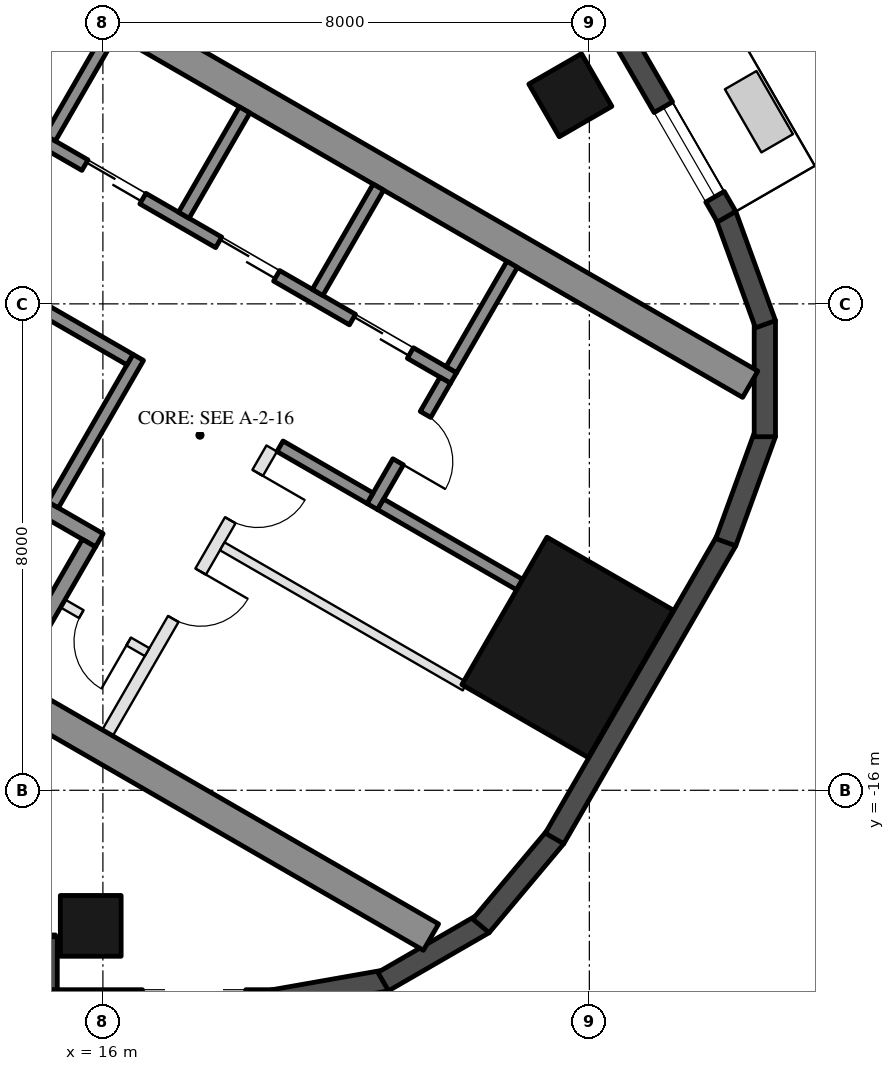
"""IFC4 building model, lengths in metres.
Left out: names, types, materials, properties, quantities, classifications, styles, units other than length and angle.
Written with IfcOpenShell. Run it as: python <this file> out.ifc"""

import sys

from ifc_helpers import new_model, si_unit, direction, frame, frame_2d, origin, origin_2d, place, context, subcontext, project, spatial, rectangle, hollow_rectangle, extrude, element, fill, save


model = new_model("IFC4")
c1 = context("Model", 3, precision=1e-05, world=origin(), true_north=direction((0.0, 1.0)))
c2 = subcontext(c1, "Body", "Model", "MODEL_VIEW")
j1 = project(units=[si_unit("LENGTHUNIT", "METRE"), si_unit("PLANEANGLEUNIT", "RADIAN")], contexts=[c1])
p1 = place(None, origin())
s1 = spatial("IfcSite", under=j1, at=p1, CompositionType="ELEMENT")
p2 = place(p1, origin())
s2 = spatial("IfcBuilding", under=s1, at=p2, CompositionType="ELEMENT")
p3 = place(p2, frame((0.0, 0.0, 79.8)))
s3 = spatial("IfcBuildingStorey", under=s2, at=p3, CompositionType="ELEMENT", Elevation=79.8)
for number, where, z_axis, x_axis in (
    (1, (15.8, -18.23, 0.0), (0.0, 0.0, 1.0), (-1.0, 0.0, 0.0)),
    (2, (23.688, -4.568, 0.0), (0.0, 0.0, 1.0), (-0.5, 0.866, 0.0)),
):
    element("IfcColumn", number, at=place(p3, frame(where, z_axis=z_axis, x_axis=x_axis)), inside=s3, PredefinedType="COLUMN", context=c2, shape_type="SweptSolid", body=[
        extrude(hollow_rectangle(XDim=1.0, YDim=1.0, WallThickness=0.045, at=origin_2d()), origin(), (0.0, 0.0, 1.0), 3.7),
    ])
p4 = place(p3, frame((23.643, -13.65, 0.0), z_axis=(0.0, 0.0, 1.0), x_axis=(0.5, 0.866025403784, 0.0)))
e3 = element("IfcColumn", 3, at=p4, inside=s3, PredefinedType="COLUMN", context=c2, shape_type="SweptSolid", body=[
    extrude(hollow_rectangle(XDim=2.8, YDim=2.4, WallThickness=0.07, at=origin_2d()), origin(), (0.0, 0.0, 1.0), 3.7),
])
p5 = place(p3, frame((8.48, -18.555, 0.0), z_axis=(0.0, 0.0, 1.0), x_axis=(1.0, 0.0, 0.0)))
e4 = element("IfcWall", 4, at=p5, inside=s3, PredefinedType="SOLIDWALL", context=c2, shape_type="SweptSolid", body=[
    extrude(rectangle(XDim=6.74, YDim=0.35, at=frame_2d((3.37, 0.0))), origin(), (0.0, 0.0, 1.0), 3.55),
])
p6 = place(p5, frame((3.57, 0.0, 0.0)))
e5 = element("IfcOpeningElement", 5, at=p6, cuts=e4, PredefinedType="OPENING", context=c2, shape_type="SweptSolid", body=[
    extrude(rectangle(XDim=2.4, YDim=2.4, at=frame_2d((1.2, 1.2))), frame((0.0, 0.185, 0.0), z_axis=(0.0, -1.0, 0.0), x_axis=(1.0, 0.0, 0.0)), (0.0, 0.0, 1.0), 0.37),
])
p7 = place(p5, frame((0.77, 0.0, 0.3)))
e6 = element("IfcOpeningElement", 6, at=p7, cuts=e4, PredefinedType="OPENING", context=c2, shape_type="SweptSolid", body=[
    extrude(rectangle(XDim=2.5, YDim=2.65, at=frame_2d((1.25, 1.325))), frame((0.0, 0.185, 0.0), z_axis=(0.0, -1.0, 0.0), x_axis=(1.0, 0.0, 0.0)), (0.0, 0.0, 1.0), 0.37),
])
p8 = place(p3, frame((15.075, -18.41, 0.0), z_axis=(0.0, 0.0, 1.0), x_axis=(0.0, -1.0, 0.0)))
e7 = element("IfcWall", 7, at=p8, inside=s3, PredefinedType="SOLIDWALL", context=c2, shape_type="SweptSolid", body=[
    extrude(rectangle(XDim=1.22, YDim=0.35, at=frame_2d((0.61, 0.0))), origin(), (0.0, 0.0, 1.0), 3.55),
])
p9 = place(p3, frame((14.9, -19.455, 0.0), z_axis=(0.0, 0.0, 1.0), x_axis=(1.0, 0.0, 0.0)))
e8 = element("IfcWall", 8, at=p9, inside=s3, PredefinedType="SOLIDWALL", context=c2, shape_type="SweptSolid", body=[
    extrude(rectangle(XDim=3.916, YDim=0.35, at=frame_2d((1.958, 0.0))), origin(), (0.0, 0.0, 1.0), 3.55),
])
p10 = place(p9, frame((1.75, 0.0, 0.3)))
e9 = element("IfcOpeningElement", 9, at=p10, cuts=e8, PredefinedType="OPENING", context=c2, shape_type="SweptSolid", body=[
    extrude(rectangle(XDim=1.7, YDim=2.65, at=frame_2d((0.85, 1.325))), frame((0.0, 0.185, 0.0), z_axis=(0.0, -1.0, 0.0), x_axis=(1.0, 0.0, 0.0)), (0.0, 0.0, 1.0), 0.37),
])
p11 = place(p3, frame((18.785, -19.458, 0.0), z_axis=(0.0, 0.0, 1.0), x_axis=(0.984798995425, 0.173697837091, 0.0)))
e10 = element("IfcWall", 10, at=p11, inside=s3, PredefinedType="SOLIDWALL", context=c2, shape_type="SweptSolid", body=[
    extrude(rectangle(XDim=1.91, YDim=0.35, at=frame_2d((0.955, 0.0))), origin(), (0.0, 0.0, 1.0), 3.55),
])
for number, where, z_axis, x_axis in (
    (11, (20.61, -19.147, 0.0), (0.0, 0.0, 1.0), (0.866, 0.5, 0.0)),
    (12, (22.217, -18.231, 0.0), (0.0, 0.0, 1.0), (0.643, 0.766, 0.0)),
):
    element("IfcWall", number, at=place(p3, frame(where, z_axis=z_axis, x_axis=x_axis)), inside=s3, PredefinedType="SOLIDWALL", context=c2, shape_type="SweptSolid", body=[
        extrude(rectangle(XDim=1.91, YDim=0.35, at=frame_2d((0.955, 0.0))), origin(), (0.0, 0.0, 1.0), 3.55),
    ])
p12 = place(p3, frame((23.427, -16.792, 0.0), z_axis=(0.0, 0.0, 1.0), x_axis=(0.500018773155, 0.866014564827, 0.0)))
e13 = element("IfcWall", 13, at=p12, inside=s3, PredefinedType="SOLIDWALL", context=c2, shape_type="SweptSolid", body=[
    extrude(rectangle(XDim=5.658, YDim=0.35, at=frame_2d((2.829, 0.0))), origin(), (0.0, 0.0, 1.0), 3.55),
])
for number, where, z_axis, x_axis in (
    (14, (26.244, -11.92, 0.0), (0.0, 0.0, 1.0), (0.342, 0.94, 0.0)),
    (15, (26.886, -10.185, 0.0), (0.0, 0.0, 1.0), (0.0, 1.0, 0.0)),
    (16, (26.897, -8.335, 0.0), (0.0, 0.0, 1.0), (-0.342, 0.94, 0.0)),
):
    element("IfcWall", number, at=place(p3, frame(where, z_axis=z_axis, x_axis=x_axis)), inside=s3, PredefinedType="SOLIDWALL", context=c2, shape_type="SweptSolid", body=[
        extrude(rectangle(XDim=1.91, YDim=0.35, at=frame_2d((0.955, 0.0))), origin(), (0.0, 0.0, 1.0), 3.55),
    ])
p13 = place(p3, frame((26.257, -6.567, 0.0), z_axis=(0.0, 0.0, 1.0), x_axis=(-0.500023526245, 0.866011820475, 0.0)))
e17 = element("IfcWall", 17, at=p13, inside=s3, PredefinedType="SOLIDWALL", context=c2, shape_type="SweptSolid", body=[
    extrude(rectangle(XDim=11.816, YDim=0.35, at=frame_2d((5.908, 0.0))), origin(), (0.0, 0.0, 1.0), 3.55),
])
p14 = place(p13, frame((0.38, 0.0, 0.3)))
e18 = element("IfcOpeningElement", 18, at=p14, cuts=e17, PredefinedType="OPENING", context=c2, shape_type="SweptSolid", body=[
    extrude(rectangle(XDim=1.7, YDim=2.65, at=frame_2d((0.85, 1.325))), frame((0.0, 0.185, 0.0), z_axis=(0.0, -1.0, 0.0), x_axis=(1.0, 0.0, 0.0)), (0.0, 0.0, 1.0), 0.37),
])
p15 = place(p13, frame((7.666, 0.0, 0.0)))
e19 = element("IfcOpeningElement", 19, at=p15, cuts=e17, PredefinedType="OPENING", context=c2, shape_type="SweptSolid", body=[
    extrude(rectangle(XDim=2.4, YDim=2.4, at=frame_2d((1.2, 1.2))), frame((0.0, 0.185, 0.0), z_axis=(0.0, -1.0, 0.0), x_axis=(1.0, 0.0, 0.0)), (0.0, 0.0, 1.0), 0.37),
])
p16 = place(p13, frame((3.865, 0.0, 0.3)))
e20 = element("IfcOpeningElement", 20, at=p16, cuts=e17, PredefinedType="OPENING", context=c2, shape_type="SweptSolid", body=[
    extrude(rectangle(XDim=1.6, YDim=2.65, at=frame_2d((0.8, 1.325))), frame((0.0, 0.185, 0.0), z_axis=(0.0, -1.0, 0.0), x_axis=(1.0, 0.0, 0.0)), (0.0, 0.0, 1.0), 0.37),
])
p17 = place(p13, frame((5.765, 0.0, 0.3)))
e21 = element("IfcOpeningElement", 21, at=p17, cuts=e17, PredefinedType="OPENING", context=c2, shape_type="SweptSolid", body=[
    extrude(rectangle(XDim=1.6, YDim=2.65, at=frame_2d((0.8, 1.325))), frame((0.0, 0.185, 0.0), z_axis=(0.0, -1.0, 0.0), x_axis=(1.0, 0.0, 0.0)), (0.0, 0.0, 1.0), 0.37),
])
for number, where, z_axis, x_axis in (
    (22, (8.547, -10.997, 0.0), (0.0, 0.0, 1.0), (0.866, -0.5, 0.0)),
    (23, (13.797, -1.903, 0.0), (0.0, 0.0, 1.0), (0.866, -0.5, 0.0)),
):
    element("IfcWall", number, at=place(p3, frame(where, z_axis=z_axis, x_axis=x_axis)), inside=s3, PredefinedType="SHEAR", context=c2, shape_type="SweptSolid", body=[
        extrude(rectangle(XDim=14.837, YDim=0.5, at=frame_2d((7.418, 0.0))), origin(), (0.0, 0.0, 1.0), 3.5),
    ])
p18 = place(p3, frame((10.356, -8.664, 0.0), z_axis=(0.0, 0.0, 1.0), x_axis=(0.866028629588, -0.499994412703, 0.0)))
e24 = element("IfcWall", 24, at=p18, inside=s3, PredefinedType="SHEAR", context=c2, shape_type="SweptSolid", body=[
    extrude(rectangle(XDim=6.45, YDim=0.25, at=frame_2d((3.225, 0.0))), origin(), (0.0, 0.0, 1.0), 3.5),
])
p19 = place(p18, frame((0.3, 0.0, 0.0)))
e25 = element("IfcOpeningElement", 25, at=p19, cuts=e24, PredefinedType="OPENING", context=c2, shape_type="SweptSolid", body=[
    extrude(rectangle(XDim=1.0, YDim=2.1, at=frame_2d((0.5, 1.05))), frame((0.0, 0.135, 0.0), z_axis=(0.0, -1.0, 0.0), x_axis=(1.0, 0.0, 0.0)), (0.0, 0.0, 1.0), 0.27),
])
p20 = place(p3, frame((14.496, -14.143, 0.0), z_axis=(0.0, 0.0, 1.0), x_axis=(0.500062241894, 0.865989465428, 0.0)))
e26 = element("IfcWall", 26, at=p20, inside=s3, PredefinedType="SHEAR", context=c2, shape_type="SweptSolid", body=[
    extrude(rectangle(XDim=2.55, YDim=0.25, at=frame_2d((1.275, 0.0))), origin(), (0.0, 0.0, 1.0), 3.5),
])
p21 = place(p3, frame((15.181, -11.305, 0.0), z_axis=(0.0, 0.0, 1.0), x_axis=(0.49994636267, 0.866056369097, 0.0)))
e27 = element("IfcWall", 27, at=p21, inside=s3, PredefinedType="SHEAR", context=c2, shape_type="SweptSolid", body=[
    extrude(rectangle(XDim=2.8, YDim=0.2, at=frame_2d((1.4, 0.0))), origin(), (0.0, 0.0, 1.0), 3.5),
])
p22 = place(p3, frame((14.02, -7.517, 0.0), z_axis=(0.0, 0.0, 1.0), x_axis=(0.866034573852, -0.49998411664, 0.0)))
e28 = element("IfcWall", 28, at=p22, inside=s3, PredefinedType="SHEAR", context=c2, shape_type="SweptSolid", body=[
    extrude(rectangle(XDim=2.8, YDim=0.2, at=frame_2d((1.4, 0.0))), origin(), (0.0, 0.0, 1.0), 3.5),
])
p23 = place(p3, frame((12.968, -4.138, 0.0), z_axis=(0.0, 0.0, 1.0), x_axis=(0.866028328073, -0.49999493495, 0.0)))
e29 = element("IfcWall", 29, at=p23, inside=s3, PredefinedType="SHEAR", context=c2, shape_type="SweptSolid", body=[
    extrude(rectangle(XDim=10.16, YDim=0.2, at=frame_2d((5.08, 0.0))), origin(), (0.0, 0.0, 1.0), 3.5),
])
p24 = place(p23, frame((0.62, 0.0, 0.0)))
e30 = element("IfcOpeningElement", 30, at=p24, cuts=e29, PredefinedType="OPENING", context=c2, shape_type="SweptSolid", body=[
    extrude(rectangle(XDim=1.1, YDim=2.1, at=frame_2d((0.55, 1.05))), frame((0.0, 0.11, 0.0), z_axis=(0.0, -1.0, 0.0), x_axis=(1.0, 0.0, 0.0)), (0.0, 0.0, 1.0), 0.22),
])
p25 = place(p23, frame((3.16, 0.0, 0.0)))
e31 = element("IfcOpeningElement", 31, at=p25, cuts=e29, PredefinedType="OPENING", context=c2, shape_type="SweptSolid", body=[
    extrude(rectangle(XDim=1.1, YDim=2.1, at=frame_2d((0.55, 1.05))), frame((0.0, 0.11, 0.0), z_axis=(0.0, -1.0, 0.0), x_axis=(1.0, 0.0, 0.0)), (0.0, 0.0, 1.0), 0.22),
])
p26 = place(p23, frame((5.7, 0.0, 0.0)))
e32 = element("IfcOpeningElement", 32, at=p26, cuts=e29, PredefinedType="OPENING", context=c2, shape_type="SweptSolid", body=[
    extrude(rectangle(XDim=1.1, YDim=2.1, at=frame_2d((0.55, 1.05))), frame((0.0, 0.11, 0.0), z_axis=(0.0, -1.0, 0.0), x_axis=(1.0, 0.0, 0.0)), (0.0, 0.0, 1.0), 0.22),
])
p27 = place(p23, frame((8.24, 0.0, 0.0)))
e33 = element("IfcOpeningElement", 33, at=p27, cuts=e29, PredefinedType="OPENING", context=c2, shape_type="SweptSolid", body=[
    extrude(rectangle(XDim=1.1, YDim=2.1, at=frame_2d((0.55, 1.05))), frame((0.0, 0.11, 0.0), z_axis=(0.0, -1.0, 0.0), x_axis=(1.0, 0.0, 0.0)), (0.0, 0.0, 1.0), 0.22),
])
p28 = place(p3, frame((20.43, -11.333, 0.0), z_axis=(0.0, 0.0, 1.0), x_axis=(0.500001309137, 0.866024647952, 0.0)))
e34 = element("IfcWall", 34, at=p28, inside=s3, PredefinedType="SHEAR", context=c2, shape_type="SweptSolid", body=[
    extrude(rectangle(XDim=2.4, YDim=0.2, at=frame_2d((1.2, 0.0))), origin(), (0.0, 0.0, 1.0), 3.5),
])
p29 = place(p28, frame((0.85, 0.0, 0.0)))
e35 = element("IfcOpeningElement", 35, at=p29, cuts=e34, PredefinedType="OPENING", context=c2, shape_type="SweptSolid", body=[
    extrude(rectangle(XDim=0.9, YDim=2.1, at=frame_2d((0.45, 1.05))), frame((0.0, 0.11, 0.0), z_axis=(0.0, -1.0, 0.0), x_axis=(1.0, 0.0, 0.0)), (0.0, 0.0, 1.0), 0.22),
])
p30 = place(p3, frame((18.913, -10.342, 0.0), z_axis=(0.0, 0.0, 1.0), x_axis=(0.866038183914, -0.499977863513, 0.0)))
e36 = element("IfcWall", 36, at=p30, inside=s3, PredefinedType="SHEAR", context=c2, shape_type="SweptSolid", body=[
    extrude(rectangle(XDim=1.71, YDim=0.2, at=frame_2d((0.855, 0.0))), origin(), (0.0, 0.0, 1.0), 3.5),
])
for number, where, z_axis, x_axis in (
    (37, (15.131, -5.272, 0.0), (0.0, 0.0, 1.0), (0.5, 0.866, 0.0)),
    (38, (17.331, -6.542, 0.0), (0.0, 0.0, 1.0), (0.5, 0.866, 0.0)),
    (39, (19.531, -7.812, 0.0), (0.0, 0.0, 1.0), (0.5, 0.866, 0.0)),
    (40, (21.73, -9.082, 0.0), (0.0, 0.0, 1.0), (0.5, 0.866, 0.0)),
):
    element("IfcWall", number, at=place(p3, frame(where, z_axis=z_axis, x_axis=x_axis)), inside=s3, PredefinedType="SHEAR", context=c2, shape_type="SweptSolid", body=[
        extrude(rectangle(XDim=2.0, YDim=0.2, at=frame_2d((1.0, 0.0))), origin(), (0.0, 0.0, 1.0), 3.5),
    ])
p31 = place(p3, frame((20.567, -11.297, 0.0), z_axis=(0.0, 0.0, 1.0), x_axis=(0.866060851709, -0.499938597367, 0.0)))
e41 = element("IfcWall", 41, at=p31, inside=s3, PredefinedType="SHEAR", context=c2, shape_type="SweptSolid", body=[
    extrude(rectangle(XDim=2.64, YDim=0.2, at=frame_2d((1.32, 0.0))), origin(), (0.0, 0.0, 1.0), 3.5),
])
p32 = place(p3, frame((16.076, -15.055, 0.0), z_axis=(0.0, 0.0, 1.0), x_axis=(0.499995103361, 0.866028230842, 0.0)))
e42 = element("IfcWall", 42, at=p32, inside=s3, PredefinedType="PARTITIONING", context=c2, shape_type="SweptSolid", body=[
    extrude(rectangle(XDim=5.4, YDim=0.2, at=frame_2d((2.7, 0.0))), origin(), (0.0, 0.0, 1.0), 3.5),
])
p33 = place(p32, frame((2.163, 0.0, 0.0)))
e43 = element("IfcOpeningElement", 43, at=p33, cuts=e42, PredefinedType="OPENING", context=c2, shape_type="SweptSolid", body=[
    extrude(rectangle(XDim=0.9, YDim=2.1, at=frame_2d((0.45, 1.05))), frame((0.0, 0.11, 0.0), z_axis=(0.0, -1.0, 0.0), x_axis=(1.0, 0.0, 0.0)), (0.0, 0.0, 1.0), 0.22),
])
p34 = place(p32, frame((4.038, 0.0, 0.0)))
e44 = element("IfcOpeningElement", 44, at=p34, cuts=e42, PredefinedType="OPENING", context=c2, shape_type="SweptSolid", body=[
    extrude(rectangle(XDim=0.9, YDim=2.1, at=frame_2d((0.45, 1.05))), frame((0.0, 0.11, 0.0), z_axis=(0.0, -1.0, 0.0), x_axis=(1.0, 0.0, 0.0)), (0.0, 0.0, 1.0), 0.22),
])
p35 = place(p3, frame((15.342, -12.928, 0.0), z_axis=(0.0, 0.0, 1.0), x_axis=(0.865989903783, -0.500061482766, 0.0)))
e45 = element("IfcWall", 45, at=p35, inside=s3, PredefinedType="PARTITIONING", context=c2, shape_type="SweptSolid", body=[
    extrude(rectangle(XDim=1.6, YDim=0.15, at=frame_2d((0.8, 0.0))), origin(), (0.0, 0.0, 1.0), 3.5),
])
p36 = place(p35, frame((0.35, 0.0, 0.0)))
e46 = element("IfcOpeningElement", 46, at=p36, cuts=e45, PredefinedType="OPENING", context=c2, shape_type="SweptSolid", body=[
    extrude(rectangle(XDim=0.9, YDim=2.1, at=frame_2d((0.45, 1.05))), frame((0.0, 0.085, 0.0), z_axis=(0.0, -1.0, 0.0), x_axis=(1.0, 0.0, 0.0)), (0.0, 0.0, 1.0), 0.17),
])
p37 = place(p3, frame((17.963, -11.987, 0.0), z_axis=(0.0, 0.0, 1.0), x_axis=(0.865998608524, -0.500046407882, 0.0)))
e47 = element("IfcWall", 47, at=p37, inside=s3, PredefinedType="PARTITIONING", context=c2, shape_type="SweptSolid", body=[
    extrude(rectangle(XDim=4.61, YDim=0.15, at=frame_2d((2.305, 0.0))), origin(), (0.0, 0.0, 1.0), 3.5),
])
p38 = place(p14, origin())
e48 = element("IfcWindow", 48, at=p38, inside=s3, PartitioningType="SINGLE_PANEL", PredefinedType="WINDOW", context=c2, shape_type="SweptSolid", body=[
    extrude(rectangle(XDim=1.7, YDim=2.65, at=frame_2d((0.85, 1.325))), frame((0.0, 0.03, 0.0), z_axis=(0.0, -1.0, 0.0), x_axis=(1.0, 0.0, 0.0)), (0.0, 0.0, 1.0), 0.06),
])
fill(e18, e48)
p39 = place(p36, frame((0.9, 0.0, 0.0), z_axis=(0.0, 0.0, 1.0), x_axis=(-1.0, 0.0, 0.0)))
e49 = element("IfcDoor", 49, at=p39, inside=s3, OperationType="SINGLE_SWING_LEFT", PredefinedType="DOOR", context=c2, shape_type="SweptSolid", body=[
    extrude(rectangle(XDim=0.9, YDim=2.1, at=frame_2d((0.45, 1.05))), frame((0.0, 0.025, 0.0), z_axis=(0.0, -1.0, 0.0), x_axis=(1.0, 0.0, 0.0)), (0.0, 0.0, 1.0), 0.05),
])
fill(e46, e49)
p40 = place(p25, origin())
e50 = element("IfcDoor", 50, at=p40, inside=s3, OperationType="DOUBLE_DOOR_SLIDING", PredefinedType="DOOR", context=c2, shape_type="SweptSolid", body=[
    extrude(rectangle(XDim=1.1, YDim=2.1, at=frame_2d((0.55, 1.05))), frame((0.0, 0.025, 0.0), z_axis=(0.0, -1.0, 0.0), x_axis=(1.0, 0.0, 0.0)), (0.0, 0.0, 1.0), 0.05),
])
fill(e31, e50)
p41 = place(p26, origin())
e51 = element("IfcDoor", 51, at=p41, inside=s3, OperationType="DOUBLE_DOOR_SLIDING", PredefinedType="DOOR", context=c2, shape_type="SweptSolid", body=[
    extrude(rectangle(XDim=1.1, YDim=2.1, at=frame_2d((0.55, 1.05))), frame((0.0, 0.025, 0.0), z_axis=(0.0, -1.0, 0.0), x_axis=(1.0, 0.0, 0.0)), (0.0, 0.0, 1.0), 0.05),
])
fill(e32, e51)
p42 = place(p27, origin())
e52 = element("IfcDoor", 52, at=p42, inside=s3, OperationType="DOUBLE_DOOR_SLIDING", PredefinedType="DOOR", context=c2, shape_type="SweptSolid", body=[
    extrude(rectangle(XDim=1.1, YDim=2.1, at=frame_2d((0.55, 1.05))), frame((0.0, 0.025, 0.0), z_axis=(0.0, -1.0, 0.0), x_axis=(1.0, 0.0, 0.0)), (0.0, 0.0, 1.0), 0.05),
])
fill(e33, e52)
p43 = place(p29, frame((0.9, 0.0, 0.0), z_axis=(0.0, 0.0, 1.0), x_axis=(-1.0, 0.0, 0.0)))
e53 = element("IfcDoor", 53, at=p43, inside=s3, OperationType="SINGLE_SWING_RIGHT", PredefinedType="DOOR", context=c2, shape_type="SweptSolid", body=[
    extrude(rectangle(XDim=0.9, YDim=2.1, at=frame_2d((0.45, 1.05))), frame((0.0, 0.025, 0.0), z_axis=(0.0, -1.0, 0.0), x_axis=(1.0, 0.0, 0.0)), (0.0, 0.0, 1.0), 0.05),
])
fill(e35, e53)
p44 = place(p33, frame((0.9, 0.0, 0.0), z_axis=(0.0, 0.0, 1.0), x_axis=(-1.0, 0.0, 0.0)))
e54 = element("IfcDoor", 54, at=p44, inside=s3, OperationType="SINGLE_SWING_LEFT", PredefinedType="DOOR", context=c2, shape_type="SweptSolid", body=[
    extrude(rectangle(XDim=0.9, YDim=2.1, at=frame_2d((0.45, 1.05))), frame((0.0, 0.025, 0.0), z_axis=(0.0, -1.0, 0.0), x_axis=(1.0, 0.0, 0.0)), (0.0, 0.0, 1.0), 0.05),
])
fill(e43, e54)
p45 = place(p34, frame((0.9, 0.0, 0.0), z_axis=(0.0, 0.0, 1.0), x_axis=(-1.0, 0.0, 0.0)))
e55 = element("IfcDoor", 55, at=p45, inside=s3, OperationType="SINGLE_SWING_LEFT", PredefinedType="DOOR", context=c2, shape_type="SweptSolid", body=[
    extrude(rectangle(XDim=0.9, YDim=2.1, at=frame_2d((0.45, 1.05))), frame((0.0, 0.025, 0.0), z_axis=(0.0, -1.0, 0.0), x_axis=(1.0, 0.0, 0.0)), (0.0, 0.0, 1.0), 0.05),
])
fill(e44, e55)
save(model, sys.argv[1])
